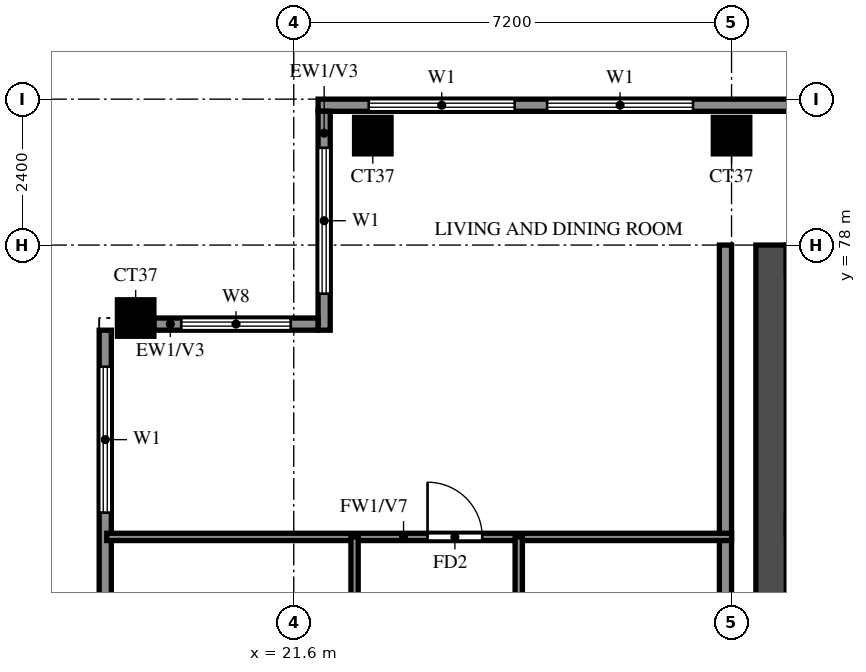
"""IFC4 building model, lengths in metres.
Left out: names, types, materials, properties, quantities, classifications, styles, units other than length and angle.
Written with IfcOpenShell. Run it as: python <this file> out.ifc"""

import sys

from ifc_helpers import new_model, si_unit, direction, frame, frame_2d, origin, origin_2d, place, context, subcontext, project, spatial, rectangle, extrude, source, transform, mapped, element, fill, save


model = new_model("IFC4")
c1 = context("Model", 3, precision=1e-05, world=origin(), true_north=direction((0.0, 1.0)))
c2 = subcontext(c1, "Body", "Model", "MODEL_VIEW")
j1 = project(units=[si_unit("LENGTHUNIT", "METRE"), si_unit("PLANEANGLEUNIT", "RADIAN")], contexts=[c1])
p1 = place(None, origin())
s1 = spatial("IfcSite", under=j1, at=p1, CompositionType="ELEMENT")
p2 = place(p1, origin())
s2 = spatial("IfcBuilding", under=s1, at=p2, CompositionType="ELEMENT")
p3 = place(p2, frame((0.0, 0.0, 264.0)))
s3 = spatial("IfcBuildingStorey", under=s2, at=p3, CompositionType="ELEMENT", Elevation=264.0)
m1 = source(origin(), c2, "Body", "SweptSolid", [
    extrude(rectangle(XDim=0.6, YDim=0.6, at=origin_2d()), origin(), (0.0, 0.0, 1.0), 3.22),
])
for number, where, z_axis, x_axis in (
    (1, (19.0, 76.8, 0.0), (0.0, 0.0, 1.0), (1.0, 0.0, 0.0)),
    (2, (22.9, 79.8, 0.0), (0.0, 0.0, 1.0), (1.0, 0.0, 0.0)),
    (3, (28.8, 79.8, 0.0), (0.0, 0.0, 1.0), (1.0, 0.0, 0.0)),
):
    element("IfcColumn", number, at=place(p3, frame(where, z_axis=z_axis, x_axis=x_axis)), inside=s3, PredefinedType="COLUMN", context=c2, shape_type="MappedRepresentation", body=[
        mapped(m1, transform((0.0, 0.0, 0.0))),
    ])
p4 = place(p3, frame((29.45, 66.15, 0.0), z_axis=(0.0, 0.0, 1.0), x_axis=(0.0, 1.0, 0.0)))
e4 = element("IfcWall", 4, at=p4, inside=s3, PredefinedType="SHEAR", context=c2, shape_type="SweptSolid", body=[
    extrude(rectangle(XDim=11.85, YDim=0.5, at=frame_2d((5.925, 0.0))), origin(), (0.0, 0.0, 1.0), 3.22),
])
p5 = place(p3, frame((78.6, 80.3, 0.0), z_axis=(0.0, 0.0, 1.0), x_axis=(-1.0, 0.0, 0.0)))
e5 = element("IfcWall", 5, at=p5, inside=s3, PredefinedType="SOLIDWALL", context=c2, shape_type="SweptSolid", body=[
    extrude(rectangle(XDim=56.6, YDim=0.2, at=frame_2d((28.3, 0.0))), origin(), (0.0, 0.0, 1.0), 3.22),
])
p6 = place(p5, frame((3.9, 0.0, 0.0)))
e6 = element("IfcOpeningElement", 6, at=p6, cuts=e5, PredefinedType="OPENING", context=c2, shape_type="SweptSolid", body=[
    extrude(rectangle(XDim=1.8, YDim=2.4, at=frame_2d((0.9, 1.2))), frame((0.0, 0.11, 0.0), z_axis=(0.0, -1.0, 0.0), x_axis=(1.0, 0.0, 0.0)), (0.0, 0.0, 1.0), 0.22),
])
p7 = place(p5, frame((50.433, 0.0, 0.6)))
e7 = element("IfcOpeningElement", 7, at=p7, cuts=e5, PredefinedType="OPENING", context=c2, shape_type="SweptSolid", body=[
    extrude(rectangle(XDim=2.4, YDim=2.4, at=frame_2d((1.2, 1.2))), frame((0.0, 0.11, 0.0), z_axis=(0.0, -1.0, 0.0), x_axis=(1.0, 0.0, 0.0)), (0.0, 0.0, 1.0), 0.22),
])
p8 = place(p5, frame((53.367, 0.0, 0.6)))
e8 = element("IfcOpeningElement", 8, at=p8, cuts=e5, PredefinedType="OPENING", context=c2, shape_type="SweptSolid", body=[
    extrude(rectangle(XDim=2.4, YDim=2.4, at=frame_2d((1.2, 1.2))), frame((0.0, 0.11, 0.0), z_axis=(0.0, -1.0, 0.0), x_axis=(1.0, 0.0, 0.0)), (0.0, 0.0, 1.0), 0.22),
])
p9 = place(p5, frame((0.4, 0.0, 0.6)))
e9 = element("IfcOpeningElement", 9, at=p9, cuts=e5, PredefinedType="OPENING", context=c2, shape_type="SweptSolid", body=[
    extrude(rectangle(XDim=1.2, YDim=2.4, at=frame_2d((0.6, 1.2))), frame((0.0, 0.11, 0.0), z_axis=(0.0, -1.0, 0.0), x_axis=(1.0, 0.0, 0.0)), (0.0, 0.0, 1.0), 0.22),
])
p10 = place(p5, frame((2.55, 0.0, 0.6)))
e10 = element("IfcOpeningElement", 10, at=p10, cuts=e5, PredefinedType="OPENING", context=c2, shape_type="SweptSolid", body=[
    extrude(rectangle(XDim=0.9, YDim=2.4, at=frame_2d((0.45, 1.2))), frame((0.0, 0.11, 0.0), z_axis=(0.0, -1.0, 0.0), x_axis=(1.0, 0.0, 0.0)), (0.0, 0.0, 1.0), 0.22),
])
p11 = place(p3, frame((22.1, 80.2, 0.0), z_axis=(0.0, 0.0, 1.0), x_axis=(0.0, -1.0, 0.0)))
e11 = element("IfcWall", 11, at=p11, inside=s3, PredefinedType="SOLIDWALL", context=c2, shape_type="SweptSolid", body=[
    extrude(rectangle(XDim=3.6, YDim=0.2, at=frame_2d((1.8, 0.0))), origin(), (0.0, 0.0, 1.0), 3.22),
])
p12 = place(p11, frame((0.6, 0.0, 0.6)))
e12 = element("IfcOpeningElement", 12, at=p12, cuts=e11, PredefinedType="OPENING", context=c2, shape_type="SweptSolid", body=[
    extrude(rectangle(XDim=2.4, YDim=2.4, at=frame_2d((1.2, 1.2))), frame((0.0, 0.11, 0.0), z_axis=(0.0, -1.0, 0.0), x_axis=(1.0, 0.0, 0.0)), (0.0, 0.0, 1.0), 0.22),
])
p13 = place(p3, frame((22.0, 76.7, 0.0), z_axis=(0.0, 0.0, 1.0), x_axis=(-1.0, 0.0, 0.0)))
e13 = element("IfcWall", 13, at=p13, inside=s3, PredefinedType="SOLIDWALL", context=c2, shape_type="SweptSolid", body=[
    extrude(rectangle(XDim=2.7, YDim=0.2, at=frame_2d((1.35, 0.0))), origin(), (0.0, 0.0, 1.0), 3.22),
])
p14 = place(p13, frame((0.45, 0.0, 0.6)))
e14 = element("IfcOpeningElement", 14, at=p14, cuts=e13, PredefinedType="OPENING", context=c2, shape_type="SweptSolid", body=[
    extrude(rectangle(XDim=1.8, YDim=2.4, at=frame_2d((0.9, 1.2))), frame((0.0, 0.11, 0.0), z_axis=(0.0, -1.0, 0.0), x_axis=(1.0, 0.0, 0.0)), (0.0, 0.0, 1.0), 0.22),
])
p15 = place(p3, frame((18.5, 76.6, 0.0), z_axis=(0.0, 0.0, 1.0), x_axis=(0.0, -1.0, 0.0)))
e15 = element("IfcWall", 15, at=p15, inside=s3, PredefinedType="SOLIDWALL", context=c2, shape_type="SweptSolid", body=[
    extrude(rectangle(XDim=14.2, YDim=0.2, at=frame_2d((7.1, 0.0))), origin(), (0.0, 0.0, 1.0), 3.22),
])
p16 = place(p15, frame((11.1, 0.0, 0.6)))
e16 = element("IfcOpeningElement", 16, at=p16, cuts=e15, PredefinedType="OPENING", context=c2, shape_type="SweptSolid", body=[
    extrude(rectangle(XDim=2.4, YDim=2.4, at=frame_2d((1.2, 1.2))), frame((0.0, 0.11, 0.0), z_axis=(0.0, -1.0, 0.0), x_axis=(1.0, 0.0, 0.0)), (0.0, 0.0, 1.0), 0.22),
])
p17 = place(p15, frame((7.6, 0.0, 0.6)))
e17 = element("IfcOpeningElement", 17, at=p17, cuts=e15, PredefinedType="OPENING", context=c2, shape_type="SweptSolid", body=[
    extrude(rectangle(XDim=2.4, YDim=2.4, at=frame_2d((1.2, 1.2))), frame((0.0, 0.11, 0.0), z_axis=(0.0, -1.0, 0.0), x_axis=(1.0, 0.0, 0.0)), (0.0, 0.0, 1.0), 0.22),
])
p18 = place(p15, frame((4.75, 0.0, 1.5)))
e18 = element("IfcOpeningElement", 18, at=p18, cuts=e15, PredefinedType="OPENING", context=c2, shape_type="SweptSolid", body=[
    extrude(rectangle(XDim=0.9, YDim=0.9, at=frame_2d((0.45, 0.45))), frame((0.0, 0.11, 0.0), z_axis=(0.0, -1.0, 0.0), x_axis=(1.0, 0.0, 0.0)), (0.0, 0.0, 1.0), 0.22),
])
p19 = place(p15, frame((0.6, 0.0, 0.6)))
e19 = element("IfcOpeningElement", 19, at=p19, cuts=e15, PredefinedType="OPENING", context=c2, shape_type="SweptSolid", body=[
    extrude(rectangle(XDim=2.4, YDim=2.4, at=frame_2d((1.2, 1.2))), frame((0.0, 0.11, 0.0), z_axis=(0.0, -1.0, 0.0), x_axis=(1.0, 0.0, 0.0)), (0.0, 0.0, 1.0), 0.22),
])
p20 = place(p3, frame((28.7, 62.4, 0.0), z_axis=(0.0, 0.0, 1.0), x_axis=(0.0, 1.0, 0.0)))
e20 = element("IfcWall", 20, at=p20, inside=s3, PredefinedType="SOLIDWALL", context=c2, shape_type="SweptSolid", body=[
    extrude(rectangle(XDim=15.6, YDim=0.2, at=frame_2d((7.8, 0.0))), origin(), (0.0, 0.0, 1.0), 3.22),
])
p21 = place(p3, frame((18.525, 73.2, 0.0), z_axis=(0.0, 0.0, 1.0), x_axis=(1.0, 0.0, 0.0)))
e21 = element("IfcWall", 21, at=p21, inside=s3, PredefinedType="PARTITIONING", context=c2, shape_type="SweptSolid", body=[
    extrude(rectangle(XDim=10.275, YDim=0.12, at=frame_2d((5.138, 0.0))), origin(), (0.0, 0.0, 1.0), 2.32),
])
p22 = place(p21, frame((5.275, 0.0, 0.0)))
e22 = element("IfcOpeningElement", 22, at=p22, cuts=e21, PredefinedType="OPENING", context=c2, shape_type="SweptSolid", body=[
    extrude(rectangle(XDim=0.9, YDim=2.1, at=frame_2d((0.45, 1.05))), frame((0.0, 0.07, 0.0), z_axis=(0.0, -1.0, 0.0), x_axis=(1.0, 0.0, 0.0)), (0.0, 0.0, 1.0), 0.14),
])
p23 = place(p3, frame((22.6, 69.6, 0.0), z_axis=(0.0, 0.0, 1.0), x_axis=(0.0, 1.0, 0.0)))
e23 = element("IfcWall", 23, at=p23, inside=s3, PredefinedType="PARTITIONING", context=c2, shape_type="SweptSolid", body=[
    extrude(rectangle(XDim=3.6, YDim=0.12, at=frame_2d((1.8, 0.0))), origin(), (0.0, 0.0, 1.0), 3.22),
])
p24 = place(p3, frame((25.3, 64.8, 0.0), z_axis=(0.0, 0.0, 1.0), x_axis=(0.0, 1.0, 0.0)))
e24 = element("IfcWall", 24, at=p24, inside=s3, PredefinedType="PARTITIONING", context=c2, shape_type="SweptSolid", body=[
    extrude(rectangle(XDim=8.4, YDim=0.12, at=frame_2d((4.2, 0.0))), origin(), (0.0, 0.0, 1.0), 3.22),
])
p25 = place(p24, frame((5.4, 0.0, 0.0)))
e25 = element("IfcOpeningElement", 25, at=p25, cuts=e24, PredefinedType="OPENING", context=c2, shape_type="SweptSolid", body=[
    extrude(rectangle(XDim=0.9, YDim=2.1, at=frame_2d((0.45, 1.05))), frame((0.0, 0.07, 0.0), z_axis=(0.0, -1.0, 0.0), x_axis=(1.0, 0.0, 0.0)), (0.0, 0.0, 1.0), 0.14),
])
p26 = place(p7, origin())
e26 = element("IfcWindow", 26, at=p26, inside=s3, PartitioningType="DOUBLE_PANEL_VERTICAL", PredefinedType="WINDOW", context=c2, shape_type="SweptSolid", body=[
    extrude(rectangle(XDim=2.4, YDim=2.4, at=frame_2d((1.2, 1.2))), frame((0.0, 0.03, 0.0), z_axis=(0.0, -1.0, 0.0), x_axis=(1.0, 0.0, 0.0)), (0.0, 0.0, 1.0), 0.06),
])
fill(e7, e26)
p27 = place(p8, origin())
e27 = element("IfcWindow", 27, at=p27, inside=s3, PartitioningType="DOUBLE_PANEL_VERTICAL", PredefinedType="WINDOW", context=c2, shape_type="SweptSolid", body=[
    extrude(rectangle(XDim=2.4, YDim=2.4, at=frame_2d((1.2, 1.2))), frame((0.0, 0.03, 0.0), z_axis=(0.0, -1.0, 0.0), x_axis=(1.0, 0.0, 0.0)), (0.0, 0.0, 1.0), 0.06),
])
fill(e8, e27)
p28 = place(p12, origin())
e28 = element("IfcWindow", 28, at=p28, inside=s3, PartitioningType="DOUBLE_PANEL_VERTICAL", PredefinedType="WINDOW", context=c2, shape_type="SweptSolid", body=[
    extrude(rectangle(XDim=2.4, YDim=2.4, at=frame_2d((1.2, 1.2))), frame((0.0, 0.03, 0.0), z_axis=(0.0, -1.0, 0.0), x_axis=(1.0, 0.0, 0.0)), (0.0, 0.0, 1.0), 0.06),
])
fill(e12, e28)
p29 = place(p14, origin())
e29 = element("IfcWindow", 29, at=p29, inside=s3, PartitioningType="DOUBLE_PANEL_VERTICAL", PredefinedType="WINDOW", context=c2, shape_type="SweptSolid", body=[
    extrude(rectangle(XDim=1.8, YDim=2.4, at=frame_2d((0.9, 1.2))), frame((0.0, 0.03, 0.0), z_axis=(0.0, -1.0, 0.0), x_axis=(1.0, 0.0, 0.0)), (0.0, 0.0, 1.0), 0.06),
])
fill(e14, e29)
p30 = place(p19, origin())
e30 = element("IfcWindow", 30, at=p30, inside=s3, PartitioningType="DOUBLE_PANEL_VERTICAL", PredefinedType="WINDOW", context=c2, shape_type="SweptSolid", body=[
    extrude(rectangle(XDim=2.4, YDim=2.4, at=frame_2d((1.2, 1.2))), frame((0.0, 0.03, 0.0), z_axis=(0.0, -1.0, 0.0), x_axis=(1.0, 0.0, 0.0)), (0.0, 0.0, 1.0), 0.06),
])
fill(e19, e30)
p31 = place(p22, origin())
e31 = element("IfcDoor", 31, at=p31, inside=s3, OperationType="SINGLE_SWING_LEFT", PredefinedType="DOOR", context=c2, shape_type="SweptSolid", body=[
    extrude(rectangle(XDim=0.9, YDim=2.1, at=frame_2d((0.45, 1.05))), frame((0.0, 0.025, 0.0), z_axis=(0.0, -1.0, 0.0), x_axis=(1.0, 0.0, 0.0)), (0.0, 0.0, 1.0), 0.05),
])
fill(e22, e31)
save(model, sys.argv[1])
